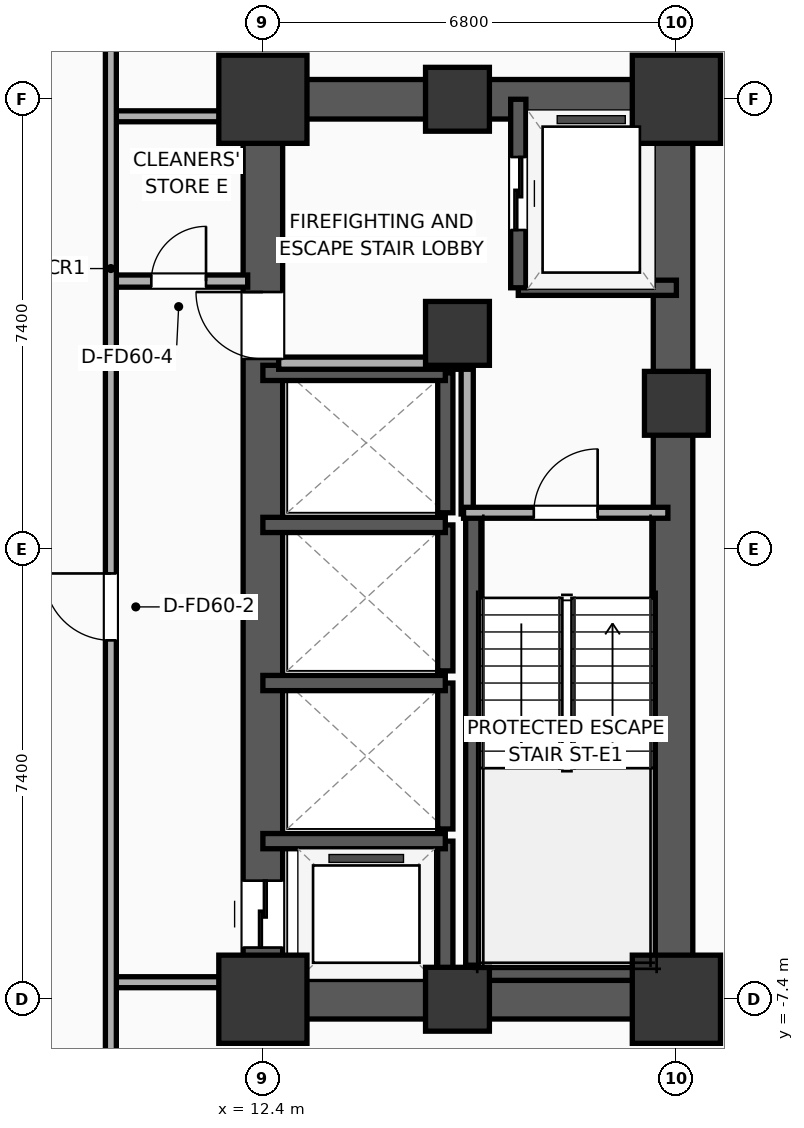
"""IFC4 building model, lengths in metres.
Left out: names, types, materials, properties, quantities, classifications, styles, units other than length and angle.
Written with IfcOpenShell. Run it as: python <this file> out.ifc"""

import sys

from ifc_helpers import new_model, si_unit, direction, frame, frame_2d, origin, origin_2d, place, context, subcontext, project, spatial, rectangle, extrude, element, fill, save


model = new_model("IFC4")
c1 = context("Model", 3, precision=1e-05, world=origin(), true_north=direction((0.0, 1.0)))
c2 = subcontext(c1, "Body", "Model", "MODEL_VIEW")
j1 = project(units=[si_unit("LENGTHUNIT", "METRE"), si_unit("PLANEANGLEUNIT", "RADIAN")], contexts=[c1])
p1 = place(None, origin())
s1 = spatial("IfcSite", under=j1, at=p1, CompositionType="ELEMENT")
p2 = place(p1, origin())
s2 = spatial("IfcBuilding", under=s1, at=p2, CompositionType="ELEMENT")
p3 = place(p2, frame((0.0, 0.0, 65.0)))
s3 = spatial("IfcBuildingStorey", under=s2, at=p3, CompositionType="ELEMENT", Elevation=65.0)
p4 = place(p3, frame((12.4, -7.4, 0.0), z_axis=(0.0, 0.0, 1.0), x_axis=(1.0, 0.0, 0.0)))
e1 = element("IfcColumn", 1, at=p4, inside=s3, PredefinedType="COLUMN", context=c2, shape_type="SweptSolid", body=[
    extrude(rectangle(XDim=1.45, YDim=1.45, at=origin_2d()), origin(), (0.0, 0.0, 1.0), 3.9),
])
p5 = place(p3, frame((15.6, 3.55, 0.0), z_axis=(0.0, 0.0, 1.0), x_axis=(1.0, 0.0, 0.0)))
e2 = element("IfcColumn", 2, at=p5, inside=s3, PredefinedType="COLUMN", context=c2, shape_type="SweptSolid", body=[
    extrude(rectangle(XDim=1.05, YDim=1.05, at=origin_2d()), origin(), (0.0, 0.0, 1.0), 3.9),
])
p6 = place(p3, frame((12.4, 7.4, 0.0), z_axis=(0.0, 0.0, 1.0), x_axis=(1.0, 0.0, 0.0)))
e3 = element("IfcColumn", 3, at=p6, inside=s3, PredefinedType="COLUMN", context=c2, shape_type="SweptSolid", body=[
    extrude(rectangle(XDim=1.45, YDim=1.45, at=origin_2d()), origin(), (0.0, 0.0, 1.0), 3.9),
])
for number, where, z_axis, x_axis in (
    (4, (15.6, -7.4, 0.0), (0.0, 0.0, 1.0), (1.0, 0.0, 0.0)),
    (5, (15.6, 7.4, 0.0), (0.0, 0.0, 1.0), (1.0, 0.0, 0.0)),
):
    element("IfcColumn", number, at=place(p3, frame(where, z_axis=z_axis, x_axis=x_axis)), inside=s3, PredefinedType="COLUMN", context=c2, shape_type="SweptSolid", body=[
        extrude(rectangle(XDim=1.05, YDim=1.05, at=origin_2d()), origin(), (0.0, 0.0, 1.0), 3.9),
    ])
p7 = place(p3, frame((19.2, -7.4, 0.0), z_axis=(0.0, 0.0, 1.0), x_axis=(1.0, 0.0, 0.0)))
e6 = element("IfcColumn", 6, at=p7, inside=s3, PredefinedType="COLUMN", context=c2, shape_type="SweptSolid", body=[
    extrude(rectangle(XDim=1.45, YDim=1.45, at=origin_2d()), origin(), (0.0, 0.0, 1.0), 3.9),
])
p8 = place(p3, frame((19.2, 2.4, 0.0), z_axis=(0.0, 0.0, 1.0), x_axis=(1.0, 0.0, 0.0)))
e7 = element("IfcColumn", 7, at=p8, inside=s3, PredefinedType="COLUMN", context=c2, shape_type="SweptSolid", body=[
    extrude(rectangle(XDim=1.05, YDim=1.05, at=origin_2d()), origin(), (0.0, 0.0, 1.0), 3.9),
])
p9 = place(p3, frame((19.2, 7.4, 0.0), z_axis=(0.0, 0.0, 1.0), x_axis=(1.0, 0.0, 0.0)))
e8 = element("IfcColumn", 8, at=p9, inside=s3, PredefinedType="COLUMN", context=c2, shape_type="SweptSolid", body=[
    extrude(rectangle(XDim=1.45, YDim=1.45, at=origin_2d()), origin(), (0.0, 0.0, 1.0), 3.9),
])
for number, where, z_axis, x_axis in (
    (9, (12.075, -7.4, 0.0), (0.0, 0.0, 1.0), (1.0, 0.0, 0.0)),
    (10, (12.075, 7.4, 0.0), (0.0, 0.0, 1.0), (1.0, 0.0, 0.0)),
):
    element("IfcWall", number, at=place(p3, frame(where, z_axis=z_axis, x_axis=x_axis)), inside=s3, PredefinedType="SHEAR", context=c2, shape_type="SweptSolid", body=[
        extrude(rectangle(XDim=7.45, YDim=0.65, at=frame_2d((3.725, 0.0))), origin(), (0.0, 0.0, 1.0), 3.65),
    ])
p10 = place(p3, frame((12.4, -7.4, 0.0), z_axis=(0.0, 0.0, 1.0), x_axis=(0.0, 1.0, 0.0)))
e11 = element("IfcWall", 11, at=p10, inside=s3, PredefinedType="SHEAR", context=c2, shape_type="SweptSolid", body=[
    extrude(rectangle(XDim=14.8, YDim=0.65, at=frame_2d((7.4, 0.0))), origin(), (0.0, 0.0, 1.0), 3.65),
])
p11 = place(p10, frame((0.85, 0.0, 0.0)))
e12 = element("IfcOpeningElement", 12, at=p11, cuts=e11, PredefinedType="OPENING", context=c2, shape_type="SweptSolid", body=[
    extrude(rectangle(XDim=1.1, YDim=2.05, at=frame_2d((0.55, 1.025))), frame((0.0, 0.335, 0.0), z_axis=(0.0, -1.0, 0.0), x_axis=(1.0, 0.0, 0.0)), (0.0, 0.0, 1.0), 0.67),
])
p12 = place(p10, frame((10.53, 0.0, 0.0)))
e13 = element("IfcOpeningElement", 13, at=p12, cuts=e11, PredefinedType="OPENING", context=c2, shape_type="SweptSolid", body=[
    extrude(rectangle(XDim=1.1, YDim=2.05, at=frame_2d((0.55, 1.025))), frame((0.0, 0.335, 0.0), z_axis=(0.0, -1.0, 0.0), x_axis=(1.0, 0.0, 0.0)), (0.0, 0.0, 1.0), 0.67),
])
p13 = place(p3, frame((19.145, -7.4, 0.0), z_axis=(0.0, 0.0, 1.0), x_axis=(0.0, 1.0, 0.0)))
e14 = element("IfcWall", 14, at=p13, inside=s3, PredefinedType="SHEAR", context=c2, shape_type="SweptSolid", body=[
    extrude(rectangle(XDim=14.8, YDim=0.65, at=frame_2d((7.4, 0.0))), origin(), (0.0, 0.0, 1.0), 3.65),
])
p14 = place(p3, frame((15.86, -7.085, 0.0), z_axis=(0.0, 0.0, 1.0), x_axis=(0.0, 1.0, 0.0)))
e15 = element("IfcWall", 15, at=p14, inside=s3, PredefinedType="SOLIDWALL", context=c2, shape_type="SweptSolid", body=[
    extrude(rectangle(XDim=7.685, YDim=0.25, at=frame_2d((3.843, 0.0))), origin(), (0.0, 0.0, 1.0), 3.65),
])
p15 = place(p3, frame((15.74, -6.965, 0.0), z_axis=(0.0, 0.0, 1.0), x_axis=(1.0, 0.0, 0.0)))
e16 = element("IfcWall", 16, at=p15, inside=s3, PredefinedType="SOLIDWALL", context=c2, shape_type="SweptSolid", body=[
    extrude(rectangle(XDim=3.46, YDim=0.25, at=frame_2d((1.73, 0.0))), origin(), (0.0, 0.0, 1.0), 3.65),
])
p16 = place(p3, frame((16.6, 4.3, 0.0), z_axis=(0.0, 0.0, 1.0), x_axis=(1.0, 0.0, 0.0)))
e17 = element("IfcWall", 17, at=p16, inside=s3, PredefinedType="SOLIDWALL", context=c2, shape_type="SweptSolid", body=[
    extrude(rectangle(XDim=2.6, YDim=0.25, at=frame_2d((1.3, 0.0))), origin(), (0.0, 0.0, 1.0), 3.65),
])
p17 = place(p3, frame((16.6, 7.4, 0.0), z_axis=(0.0, 0.0, 1.0), x_axis=(0.0, -1.0, 0.0)))
e18 = element("IfcWall", 18, at=p17, inside=s3, PredefinedType="SOLIDWALL", context=c2, shape_type="SweptSolid", body=[
    extrude(rectangle(XDim=3.1, YDim=0.25, at=frame_2d((1.55, 0.0))), origin(), (0.0, 0.0, 1.0), 3.65),
])
p18 = place(p17, frame((0.95, 0.0, 0.0)))
e19 = element("IfcOpeningElement", 19, at=p18, cuts=e18, PredefinedType="OPENING", context=c2, shape_type="SweptSolid", body=[
    extrude(rectangle(XDim=1.2, YDim=2.05, at=frame_2d((0.6, 1.025))), frame((0.0, 0.135, 0.0), z_axis=(0.0, -1.0, 0.0), x_axis=(1.0, 0.0, 0.0)), (0.0, 0.0, 1.0), 0.27),
])
p19 = place(p3, frame((15.4, -7.4, 0.0), z_axis=(0.0, 0.0, 1.0), x_axis=(0.0, 1.0, 0.0)))
e20 = element("IfcWall", 20, at=p19, inside=s3, PredefinedType="SOLIDWALL", context=c2, shape_type="SweptSolid", body=[
    extrude(rectangle(XDim=2.6, YDim=0.25, at=frame_2d((1.3, 0.0))), origin(), (0.0, 0.0, 1.0), 3.65),
])
p20 = place(p3, frame((15.4, -4.8, 0.0), z_axis=(0.0, 0.0, 1.0), x_axis=(-1.0, 0.0, 0.0)))
e21 = element("IfcWall", 21, at=p20, inside=s3, PredefinedType="SOLIDWALL", context=c2, shape_type="SweptSolid", body=[
    extrude(rectangle(XDim=3.0, YDim=0.25, at=frame_2d((1.5, 0.0))), origin(), (0.0, 0.0, 1.0), 3.65),
])
p21 = place(p3, frame((15.4, -4.6, 0.0), z_axis=(0.0, 0.0, 1.0), x_axis=(0.0, 1.0, 0.0)))
e22 = element("IfcWall", 22, at=p21, inside=s3, PredefinedType="SOLIDWALL", context=c2, shape_type="SweptSolid", body=[
    extrude(rectangle(XDim=2.4, YDim=0.25, at=frame_2d((1.2, 0.0))), origin(), (0.0, 0.0, 1.0), 3.65),
])
p22 = place(p3, frame((15.4, -2.2, 0.0), z_axis=(0.0, 0.0, 1.0), x_axis=(-1.0, 0.0, 0.0)))
e23 = element("IfcWall", 23, at=p22, inside=s3, PredefinedType="SOLIDWALL", context=c2, shape_type="SweptSolid", body=[
    extrude(rectangle(XDim=3.0, YDim=0.25, at=frame_2d((1.5, 0.0))), origin(), (0.0, 0.0, 1.0), 3.65),
])
p23 = place(p3, frame((15.4, -2.0, 0.0), z_axis=(0.0, 0.0, 1.0), x_axis=(0.0, 1.0, 0.0)))
e24 = element("IfcWall", 24, at=p23, inside=s3, PredefinedType="SOLIDWALL", context=c2, shape_type="SweptSolid", body=[
    extrude(rectangle(XDim=2.4, YDim=0.25, at=frame_2d((1.2, 0.0))), origin(), (0.0, 0.0, 1.0), 3.65),
])
p24 = place(p3, frame((15.4, 0.4, 0.0), z_axis=(0.0, 0.0, 1.0), x_axis=(-1.0, 0.0, 0.0)))
e25 = element("IfcWall", 25, at=p24, inside=s3, PredefinedType="SOLIDWALL", context=c2, shape_type="SweptSolid", body=[
    extrude(rectangle(XDim=3.0, YDim=0.25, at=frame_2d((1.5, 0.0))), origin(), (0.0, 0.0, 1.0), 3.65),
])
p25 = place(p3, frame((15.4, 0.6, 0.0), z_axis=(0.0, 0.0, 1.0), x_axis=(0.0, 1.0, 0.0)))
e26 = element("IfcWall", 26, at=p25, inside=s3, PredefinedType="SOLIDWALL", context=c2, shape_type="SweptSolid", body=[
    extrude(rectangle(XDim=2.3, YDim=0.25, at=frame_2d((1.15, 0.0))), origin(), (0.0, 0.0, 1.0), 3.65),
])
p26 = place(p3, frame((15.4, 2.9, 0.0), z_axis=(0.0, 0.0, 1.0), x_axis=(-1.0, 0.0, 0.0)))
e27 = element("IfcWall", 27, at=p26, inside=s3, PredefinedType="SOLIDWALL", context=c2, shape_type="SweptSolid", body=[
    extrude(rectangle(XDim=3.0, YDim=0.25, at=frame_2d((1.5, 0.0))), origin(), (0.0, 0.0, 1.0), 3.65),
])
p27 = place(p3, frame((15.76, 0.58, 0.0), z_axis=(0.0, 0.0, 1.0), x_axis=(0.0, 1.0, 0.0)))
e28 = element("IfcWall", 28, at=p27, inside=s3, PredefinedType="PARTITIONING", context=c2, shape_type="SweptSolid", body=[
    extrude(rectangle(XDim=2.52, YDim=0.2, at=frame_2d((1.26, 0.0))), origin(), (0.0, 0.0, 1.0), 3.65),
])
p28 = place(p3, frame((12.66, 3.06, 0.0), z_axis=(0.0, 0.0, 1.0), x_axis=(1.0, 0.0, 0.0)))
e29 = element("IfcWall", 29, at=p28, inside=s3, PredefinedType="PARTITIONING", context=c2, shape_type="SweptSolid", body=[
    extrude(rectangle(XDim=3.16, YDim=0.2, at=frame_2d((1.58, 0.0))), origin(), (0.0, 0.0, 1.0), 3.65),
])
p29 = place(p3, frame((15.7, 0.6, 0.0), z_axis=(0.0, 0.0, 1.0), x_axis=(1.0, 0.0, 0.0)))
e30 = element("IfcWall", 30, at=p29, inside=s3, PredefinedType="PARTITIONING", context=c2, shape_type="SweptSolid", body=[
    extrude(rectangle(XDim=3.36, YDim=0.18, at=frame_2d((1.68, 0.0))), origin(), (0.0, 0.0, 1.0), 3.65),
])
p30 = place(p29, frame((1.155, 0.0, 0.0)))
e31 = element("IfcOpeningElement", 31, at=p30, cuts=e30, PredefinedType="OPENING", context=c2, shape_type="SweptSolid", body=[
    extrude(rectangle(XDim=1.05, YDim=2.05, at=frame_2d((0.525, 1.025))), frame((0.0, 0.1, 0.0), z_axis=(0.0, -1.0, 0.0), x_axis=(1.0, 0.0, 0.0)), (0.0, 0.0, 1.0), 0.2),
])
p31 = place(p3, frame((9.88, 4.41, 0.0), z_axis=(0.0, 0.0, 1.0), x_axis=(1.0, 0.0, 0.0)))
e32 = element("IfcWall", 32, at=p31, inside=s3, PredefinedType="PARTITIONING", context=c2, shape_type="SweptSolid", body=[
    extrude(rectangle(XDim=2.27, YDim=0.2, at=frame_2d((1.135, 0.0))), origin(), (0.0, 0.0, 1.0), 3.65),
])
p32 = place(p31, frame((0.685, 0.0, 0.0)))
e33 = element("IfcOpeningElement", 33, at=p32, cuts=e32, PredefinedType="OPENING", context=c2, shape_type="SweptSolid", body=[
    extrude(rectangle(XDim=0.9, YDim=2.05, at=frame_2d((0.45, 1.025))), frame((0.0, 0.11, 0.0), z_axis=(0.0, -1.0, 0.0), x_axis=(1.0, 0.0, 0.0)), (0.0, 0.0, 1.0), 0.22),
])
for number, where, z_axis, x_axis in (
    (34, (9.88, 7.12, 0.0), (0.0, 0.0, 1.0), (1.0, 0.0, 0.0)),
    (35, (9.88, -7.12, 0.0), (0.0, 0.0, 1.0), (1.0, 0.0, 0.0)),
):
    element("IfcWall", number, at=place(p3, frame(where, z_axis=z_axis, x_axis=x_axis)), inside=s3, PredefinedType="PARTITIONING", context=c2, shape_type="SweptSolid", body=[
        extrude(rectangle(XDim=2.27, YDim=0.18, at=frame_2d((1.135, 0.0))), origin(), (0.0, 0.0, 1.0), 2.94),
    ])
p33 = place(p3, frame((9.9, -9.48, 0.0), z_axis=(0.0, 0.0, 1.0), x_axis=(0.0, 1.0, 0.0)))
e36 = element("IfcWall", 36, at=p33, inside=s3, PredefinedType="PARTITIONING", context=c2, shape_type="SweptSolid", body=[
    extrude(rectangle(XDim=18.96, YDim=0.18, at=frame_2d((9.48, 0.0))), origin(), (0.0, 0.0, 1.0), 3.65),
])
p34 = place(p33, frame((7.982, 0.0, 0.0)))
e37 = element("IfcOpeningElement", 37, at=p34, cuts=e36, PredefinedType="OPENING", context=c2, shape_type="SweptSolid", body=[
    extrude(rectangle(XDim=1.1, YDim=2.05, at=frame_2d((0.55, 1.025))), frame((0.0, 0.1, 0.0), z_axis=(0.0, -1.0, 0.0), x_axis=(1.0, 0.0, 0.0)), (0.0, 0.0, 1.0), 0.2),
])
p35 = place(p18, origin())
e38 = element("IfcDoor", 38, at=p35, inside=s3, OperationType="SLIDING_TO_LEFT", PredefinedType="DOOR", context=c2, shape_type="SweptSolid", body=[
    extrude(rectangle(XDim=1.2, YDim=2.05, at=frame_2d((0.6, 1.025))), frame((0.0, 0.025, 0.0), z_axis=(0.0, -1.0, 0.0), x_axis=(1.0, 0.0, 0.0)), (0.0, 0.0, 1.0), 0.05),
])
fill(e19, e38)
p36 = place(p11, origin())
e39 = element("IfcDoor", 39, at=p36, inside=s3, OperationType="SLIDING_TO_LEFT", PredefinedType="DOOR", context=c2, shape_type="SweptSolid", body=[
    extrude(rectangle(XDim=1.1, YDim=2.05, at=frame_2d((0.55, 1.025))), frame((0.0, 0.025, 0.0), z_axis=(0.0, -1.0, 0.0), x_axis=(1.0, 0.0, 0.0)), (0.0, 0.0, 1.0), 0.05),
])
fill(e12, e39)
p37 = place(p30, origin())
e40 = element("IfcDoor", 40, at=p37, inside=s3, OperationType="SINGLE_SWING_RIGHT", PredefinedType="DOOR", context=c2, shape_type="SweptSolid", body=[
    extrude(rectangle(XDim=1.05, YDim=2.05, at=frame_2d((0.525, 1.025))), frame((0.0, 0.025, 0.0), z_axis=(0.0, -1.0, 0.0), x_axis=(1.0, 0.0, 0.0)), (0.0, 0.0, 1.0), 0.05),
])
fill(e31, e40)
p38 = place(p32, origin())
e41 = element("IfcDoor", 41, at=p38, inside=s3, OperationType="SINGLE_SWING_RIGHT", PredefinedType="DOOR", context=c2, shape_type="SweptSolid", body=[
    extrude(rectangle(XDim=0.9, YDim=2.05, at=frame_2d((0.45, 1.025))), frame((0.0, 0.025, 0.0), z_axis=(0.0, -1.0, 0.0), x_axis=(1.0, 0.0, 0.0)), (0.0, 0.0, 1.0), 0.05),
])
fill(e33, e41)
p39 = place(p34, origin())
e42 = element("IfcDoor", 42, at=p39, inside=s3, OperationType="SINGLE_SWING_RIGHT", PredefinedType="DOOR", context=c2, shape_type="SweptSolid", body=[
    extrude(rectangle(XDim=1.1, YDim=2.05, at=frame_2d((0.55, 1.025))), frame((0.0, 0.025, 0.0), z_axis=(0.0, -1.0, 0.0), x_axis=(1.0, 0.0, 0.0)), (0.0, 0.0, 1.0), 0.05),
])
fill(e37, e42)
p40 = place(p12, origin())
e43 = element("IfcDoor", 43, at=p40, inside=s3, OperationType="SINGLE_SWING_RIGHT", PredefinedType="DOOR", context=c2, shape_type="SweptSolid", body=[
    extrude(rectangle(XDim=1.1, YDim=2.05, at=frame_2d((0.55, 1.025))), frame((0.0, 0.025, 0.0), z_axis=(0.0, -1.0, 0.0), x_axis=(1.0, 0.0, 0.0)), (0.0, 0.0, 1.0), 0.05),
])
fill(e13, e43)
save(model, sys.argv[1])
